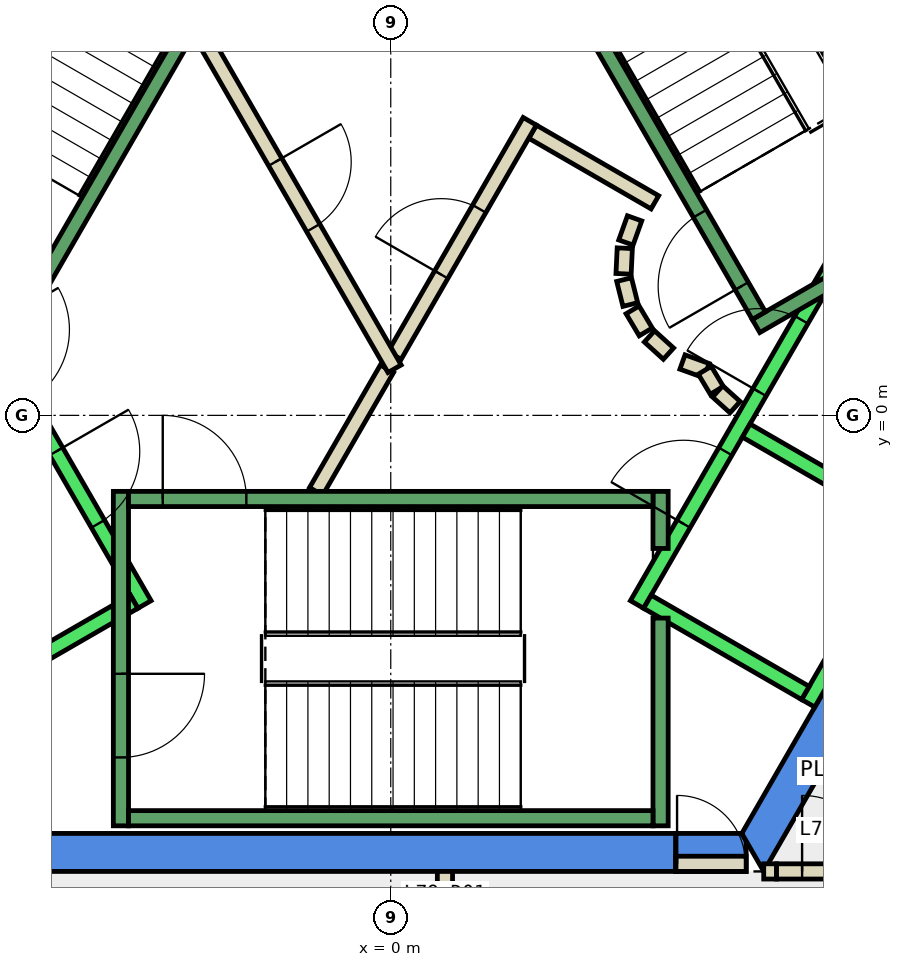
"""IFC4 building model, lengths in metres.
Left out: names, types, materials, properties, quantities, classifications, styles, units other than length and angle.
Written with IfcOpenShell. Run it as: python <this file> out.ifc"""

import sys

from ifc_helpers import new_model, si_unit, direction, frame, frame_2d, origin, place, context, subcontext, project, spatial, polyline, rectangle, outline, extrude, element, fill, save


model = new_model("IFC4")
c1 = context("Model", 3, precision=1e-05, world=origin(), true_north=direction((0.0, 1.0)))
c2 = subcontext(c1, "Body", "Model", "MODEL_VIEW")
j1 = project(units=[si_unit("LENGTHUNIT", "METRE"), si_unit("PLANEANGLEUNIT", "RADIAN")], contexts=[c1])
p1 = place(None, origin())
s1 = spatial("IfcSite", under=j1, at=p1, CompositionType="ELEMENT")
p2 = place(p1, origin())
s2 = spatial("IfcBuilding", under=s1, at=p2, CompositionType="ELEMENT")
p3 = place(p2, frame((0.0, 0.0, 335.9)))
s3 = spatial("IfcBuildingStorey", under=s2, at=p3, CompositionType="ELEMENT", Elevation=335.9)
p4 = place(p3, frame((0.0, 0.0, -0.35)))
e1 = element("IfcWall", 1, at=p4, inside=s3, PredefinedType="SHEAR", context=c2, shape_type="SweptSolid", body=[
    extrude(outline(polyline([(5.486, 9.998), (5.053, 9.748), (9.238, 2.5), (9.815, 2.5), (5.486, 9.998)])), origin(), (0.0, 0.0, 1.0), 4.4),
])
p5 = place(p3, frame((0.0, 0.0, -0.35)))
e2 = element("IfcWall", 2, at=p5, inside=s3, PredefinedType="SHEAR", context=c2, shape_type="SweptSolid", body=[
    extrude(outline(polyline([(3.75, -6.0), (3.75, -5.5), (-4.619, -5.5), (-4.907, -6.0), (3.75, -6.0)])), origin(), (0.0, 0.0, 1.0), 4.4),
])
p6 = place(p3, frame((0.0, 0.0, 3.6)))
e3 = element("IfcWall", 3, at=p6, inside=s3, PredefinedType="SHEAR", context=c2, shape_type="SweptSolid", body=[
    extrude(outline(polyline([(4.676, -6.0), (4.676, -5.6), (4.619, -5.5), (3.75, -5.5), (3.75, -6.0), (4.676, -6.0)])), origin(), (0.0, 0.0, 1.0), 0.45),
])
p7 = place(p3, frame((0.0, 0.0, -0.35)))
e4 = element("IfcWall", 4, at=p7, inside=s3, PredefinedType="SHEAR", context=c2, shape_type="SweptSolid", body=[
    extrude(outline(polyline([(4.907, -6.0), (9.815, 2.5), (9.238, 2.5), (4.619, -5.5), (4.907, -6.0)])), origin(), (0.0, 0.0, 1.0), 4.4),
])
p8 = place(p3, frame((-0.982, -1.0, 0.0), z_axis=(0.0, 0.0, 1.0), x_axis=(0.50024047865, 0.865886518847, 0.0)))
e5 = element("IfcWall", 5, at=p8, inside=s3, PredefinedType="PARTITIONING", context=c2, shape_type="SweptSolid", body=[
    extrude(rectangle(XDim=1.863, YDim=0.2, at=frame_2d((0.931, 0.0))), origin(), (0.0, 0.0, 1.0), 4.05),
])
p9 = place(p3, frame((1.866, 3.732, 0.0), z_axis=(0.0, 0.0, 1.0), x_axis=(0.866043361281, -0.499968895414, 0.0)))
e6 = element("IfcWall", 6, at=p9, inside=s3, PredefinedType="PARTITIONING", context=c2, shape_type="SweptSolid", body=[
    extrude(rectangle(XDim=1.858, YDim=0.2, at=frame_2d((0.929, 0.0))), origin(), (0.0, 0.0, 1.0), 4.05),
])
p10 = place(p3, frame((3.208, 2.592, 0.0), z_axis=(0.0, 0.0, 1.0), x_axis=(-0.337388820924, -0.941365382578, 0.0)))
e7 = element("IfcWall", 7, at=p10, inside=s3, PredefinedType="PARTITIONING", context=c2, shape_type="SweptSolid", body=[
    extrude(rectangle(XDim=0.338, YDim=0.2, at=frame_2d((0.169, 0.0))), origin(), (0.0, 0.0, 1.0), 4.05),
])
p11 = place(p3, frame((3.079, 2.199, 0.0), z_axis=(0.0, 0.0, 1.0), x_axis=(-0.047771483479, -0.998858290933, 0.0)))
e8 = element("IfcWall", 8, at=p11, inside=s3, PredefinedType="PARTITIONING", context=c2, shape_type="SweptSolid", body=[
    extrude(rectangle(XDim=0.337, YDim=0.2, at=frame_2d((0.169, 0.0))), origin(), (0.0, 0.0, 1.0), 4.05),
])
p12 = place(p3, frame((3.07, 1.786, 0.0), z_axis=(0.0, 0.0, 1.0), x_axis=(0.242705583207, -0.970099994784, 0.0)))
e9 = element("IfcWall", 9, at=p12, inside=s3, PredefinedType="PARTITIONING", context=c2, shape_type="SweptSolid", body=[
    extrude(rectangle(XDim=0.338, YDim=0.2, at=frame_2d((0.169, 0.0))), origin(), (0.0, 0.0, 1.0), 4.05),
])
for number, where, z_axis, x_axis in (
    (10, (3.182, 1.388, 0.0), (0.0, 0.0, 1.0), (0.512, -0.859, 0.0)),
    (11, (3.404, 1.039, 0.0), (0.0, 0.0, 1.0), (0.74, -0.672, 0.0)),
):
    element("IfcWall", number, at=place(p3, frame(where, z_axis=z_axis, x_axis=x_axis)), inside=s3, PredefinedType="PARTITIONING", context=c2, shape_type="SweptSolid", body=[
        extrude(rectangle(XDim=0.338, YDim=0.2, at=frame_2d((0.169, 0.0))), origin(), (0.0, 0.0, 1.0), 4.05),
    ])
p13 = place(p3, frame((3.838, 0.702, 0.0), z_axis=(0.0, 0.0, 1.0), x_axis=(0.941035081519, -0.338308993895, 0.0)))
e12 = element("IfcWall", 12, at=p13, inside=s3, PredefinedType="PARTITIONING", context=c2, shape_type="SweptSolid", body=[
    extrude(rectangle(XDim=0.337, YDim=0.2, at=frame_2d((0.168, 0.0))), origin(), (0.0, 0.0, 1.0), 4.05),
])
p14 = place(p3, frame((4.132, 0.593, 0.0), z_axis=(0.0, 0.0, 1.0), x_axis=(0.513561617048, -0.858052717201, 0.0)))
e13 = element("IfcWall", 13, at=p14, inside=s3, PredefinedType="PARTITIONING", context=c2, shape_type="SweptSolid", body=[
    extrude(rectangle(XDim=0.308, YDim=0.2, at=frame_2d((0.154, 0.0))), origin(), (0.0, 0.0, 1.0), 4.05),
])
p15 = place(p3, frame((4.301, 0.315, 0.0), z_axis=(0.0, 0.0, 1.0), x_axis=(0.741798017506, -0.670623367639, 0.0)))
e14 = element("IfcWall", 14, at=p15, inside=s3, PredefinedType="PARTITIONING", context=c2, shape_type="SweptSolid", body=[
    extrude(rectangle(XDim=0.309, YDim=0.2, at=frame_2d((0.154, 0.0))), origin(), (0.0, 0.0, 1.0), 4.05),
])
p16 = place(p3, frame((0.05, 0.787, 0.0), z_axis=(0.0, 0.0, 1.0), x_axis=(0.499954076797, 0.866051915934, 0.0)))
e15 = element("IfcWall", 15, at=p16, inside=s3, PredefinedType="PARTITIONING", context=c2, shape_type="SweptSolid", body=[
    extrude(rectangle(XDim=3.558, YDim=0.2, at=frame_2d((1.779, 0.0))), origin(), (0.0, 0.0, 1.0), 4.05),
])
p17 = place(p16, frame((1.229, 0.0, 0.0)))
e16 = element("IfcOpeningElement", 16, at=p17, cuts=e15, PredefinedType="OPENING", context=c2, shape_type="SweptSolid", body=[
    extrude(rectangle(XDim=1.0, YDim=2.1, at=frame_2d((0.5, 1.05))), frame((0.0, 0.11, 0.0), z_axis=(0.0, -1.0, 0.0), x_axis=(1.0, 0.0, 0.0)), (0.0, 0.0, 1.0), 0.22),
])
p18 = place(p3, frame((-2.54, 5.1, 0.0), z_axis=(0.0, 0.0, 1.0), x_axis=(0.499925051871, -0.866068670783, 0.0)))
e17 = element("IfcWall", 17, at=p18, inside=s3, PredefinedType="PARTITIONING", context=c2, shape_type="SweptSolid", body=[
    extrude(rectangle(XDim=5.181, YDim=0.2, at=frame_2d((2.59, 0.0))), origin(), (0.0, 0.0, 1.0), 4.05),
])
p19 = place(p18, frame((2.04, 0.0, 0.0)))
e18 = element("IfcOpeningElement", 18, at=p19, cuts=e17, PredefinedType="OPENING", context=c2, shape_type="SweptSolid", body=[
    extrude(rectangle(XDim=1.0, YDim=2.1, at=frame_2d((0.5, 1.05))), frame((0.0, 0.11, 0.0), z_axis=(0.0, -1.0, 0.0), x_axis=(1.0, 0.0, 0.0)), (0.0, 0.0, 1.0), 0.22),
])
p20 = place(p3, frame((0.713, -7.9, 0.0), z_axis=(0.0, 0.0, 1.0), x_axis=(0.0, 1.0, 0.0)))
e19 = element("IfcWall", 19, at=p20, inside=s3, PredefinedType="PARTITIONING", context=c2, shape_type="SweptSolid", body=[
    extrude(rectangle(XDim=1.9, YDim=0.2, at=frame_2d((0.95, 0.0))), origin(), (0.0, 0.0, 1.0), 4.05),
])
p21 = place(p20, frame((0.3, 0.0, 0.0)))
e20 = element("IfcOpeningElement", 20, at=p21, cuts=e19, PredefinedType="OPENING", context=c2, shape_type="SweptSolid", body=[
    extrude(rectangle(XDim=1.0, YDim=2.1, at=frame_2d((0.5, 1.05))), frame((0.0, 0.11, 0.0), z_axis=(0.0, -1.0, 0.0), x_axis=(1.0, 0.0, 0.0)), (0.0, 0.0, 1.0), 0.22),
])
p22 = place(p3, frame((4.907, -6.0, 0.0), z_axis=(0.0, 0.0, 1.0), x_axis=(1.0, 0.0, 0.0)))
e21 = element("IfcWall", 21, at=p22, inside=s3, PredefinedType="PARTITIONING", context=c2, shape_type="SweptSolid", body=[
    extrude(rectangle(XDim=0.169, YDim=0.2, at=frame_2d((0.084, 0.0))), origin(), (0.0, 0.0, 1.0), 2.4),
])
p23 = place(p3, frame((3.75, -5.9, 0.0), z_axis=(0.0, 0.0, 1.0), x_axis=(1.0, 0.0, 0.0)))
e22 = element("IfcWall", 22, at=p23, inside=s3, PredefinedType="PARTITIONING", context=c2, shape_type="SweptSolid", body=[
    extrude(rectangle(XDim=0.926, YDim=0.2, at=frame_2d((0.463, 0.0))), origin(), (0.0, 0.0, 1.0), 2.4),
])
p24 = place(p23, frame((0.017, 0.0, 0.0)))
e23 = element("IfcOpeningElement", 23, at=p24, cuts=e22, PredefinedType="OPENING", context=c2, shape_type="SweptSolid", body=[
    extrude(rectangle(XDim=0.9, YDim=2.1, at=frame_2d((0.45, 1.05))), frame((0.0, 0.11, 0.0), z_axis=(0.0, -1.0, 0.0), x_axis=(1.0, 0.0, 0.0)), (0.0, 0.0, 1.0), 0.22),
])
p25 = place(p3, frame((5.076, -6.0, 0.0), z_axis=(0.0, 0.0, 1.0), x_axis=(1.0, 0.0, 0.0)))
e24 = element("IfcWall", 24, at=p25, inside=s3, PredefinedType="PARTITIONING", context=c2, shape_type="SweptSolid", body=[
    extrude(rectangle(XDim=1.941, YDim=0.2, at=frame_2d((0.971, 0.0))), origin(), (0.0, 0.0, 1.0), 4.05),
])
p26 = place(p25, frame((0.336, 0.0, 0.0)))
e25 = element("IfcOpeningElement", 25, at=p26, cuts=e24, PredefinedType="OPENING", context=c2, shape_type="SweptSolid", body=[
    extrude(rectangle(XDim=1.0, YDim=2.1, at=frame_2d((0.5, 1.05))), frame((0.0, 0.11, 0.0), z_axis=(0.0, -1.0, 0.0), x_axis=(1.0, 0.0, 0.0)), (0.0, 0.0, 1.0), 0.22),
])
p27 = place(p3, frame((-5.94, 2.188, 0.0), z_axis=(0.0, 0.0, 1.0), x_axis=(0.500034260056, -0.866005622828, 0.0)))
e26 = element("IfcWall", 26, at=p27, inside=s3, PredefinedType="STANDARD", context=c2, shape_type="SweptSolid", body=[
    extrude(rectangle(XDim=5.399, YDim=0.2, at=frame_2d((2.7, 0.0))), origin(), (0.0, 0.0, 1.0), 4.05),
])
p28 = place(p27, frame((3.075, 0.0, 0.0)))
e27 = element("IfcOpeningElement", 27, at=p28, cuts=e26, PredefinedType="OPENING", context=c2, shape_type="SweptSolid", body=[
    extrude(rectangle(XDim=1.1, YDim=2.1, at=frame_2d((0.55, 1.05))), frame((0.0, 0.11, 0.0), z_axis=(0.0, -1.0, 0.0), x_axis=(1.0, 0.0, 0.0)), (0.0, 0.0, 1.0), 0.22),
])
p29 = place(p27, frame((1.225, 0.0, 0.0)))
e28 = element("IfcOpeningElement", 28, at=p29, cuts=e26, PredefinedType="OPENING", context=c2, shape_type="SweptSolid", body=[
    extrude(rectangle(XDim=1.1, YDim=2.1, at=frame_2d((0.55, 1.05))), frame((0.0, 0.11, 0.0), z_axis=(0.0, -1.0, 0.0), x_axis=(1.0, 0.0, 0.0)), (0.0, 0.0, 1.0), 0.22),
])
p30 = place(p3, frame((-3.377, -2.452, 0.0), z_axis=(0.0, 0.0, 1.0), x_axis=(-0.865955154139, -0.50012165622, 0.0)))
e29 = element("IfcWall", 29, at=p30, inside=s3, PredefinedType="STANDARD", context=c2, shape_type="SweptSolid", body=[
    extrude(rectangle(XDim=2.4, YDim=0.2, at=frame_2d((1.2, 0.0))), origin(), (0.0, 0.0, 1.0), 4.05),
])
p31 = place(p3, frame((3.24, -2.488, 0.0), z_axis=(0.0, 0.0, 1.0), x_axis=(0.500034260056, 0.866005622828, 0.0)))
e30 = element("IfcWall", 30, at=p31, inside=s3, PredefinedType="STANDARD", context=c2, shape_type="SweptSolid", body=[
    extrude(rectangle(XDim=5.399, YDim=0.2, at=frame_2d((2.7, 0.0))), origin(), (0.0, 0.0, 1.0), 4.05),
])
p32 = place(p31, frame((3.225, 0.0, 0.0)))
e31 = element("IfcOpeningElement", 31, at=p32, cuts=e30, PredefinedType="OPENING", context=c2, shape_type="SweptSolid", body=[
    extrude(rectangle(XDim=1.1, YDim=2.1, at=frame_2d((0.55, 1.05))), frame((0.0, 0.11, 0.0), z_axis=(0.0, -1.0, 0.0), x_axis=(1.0, 0.0, 0.0)), (0.0, 0.0, 1.0), 0.22),
])
p33 = place(p31, frame((1.225, 0.0, 0.0)))
e32 = element("IfcOpeningElement", 32, at=p33, cuts=e30, PredefinedType="OPENING", context=c2, shape_type="SweptSolid", body=[
    extrude(rectangle(XDim=1.1, YDim=2.1, at=frame_2d((0.55, 1.05))), frame((0.0, 0.11, 0.0), z_axis=(0.0, -1.0, 0.0), x_axis=(1.0, 0.0, 0.0)), (0.0, 0.0, 1.0), 0.22),
])
p34 = place(p3, frame((5.492, -3.788, 0.0), z_axis=(0.0, 0.0, 1.0), x_axis=(0.500034260056, 0.866005622828, 0.0)))
e33 = element("IfcWall", 33, at=p34, inside=s3, PredefinedType="STANDARD", context=c2, shape_type="SweptSolid", body=[
    extrude(rectangle(XDim=5.399, YDim=0.2, at=frame_2d((2.7, 0.0))), origin(), (0.0, 0.0, 1.0), 4.05),
])
p35 = place(p3, frame((3.377, -2.452, 0.0), z_axis=(0.0, 0.0, 1.0), x_axis=(0.865955154139, -0.50012165622, 0.0)))
e34 = element("IfcWall", 34, at=p35, inside=s3, PredefinedType="STANDARD", context=c2, shape_type="SweptSolid", body=[
    extrude(rectangle(XDim=2.4, YDim=0.2, at=frame_2d((1.2, 0.0))), origin(), (0.0, 0.0, 1.0), 4.05),
])
p36 = place(p3, frame((4.677, -0.2, 0.0), z_axis=(0.0, 0.0, 1.0), x_axis=(0.865973769406, -0.500089422704, 0.0)))
e35 = element("IfcWall", 35, at=p36, inside=s3, PredefinedType="STANDARD", context=c2, shape_type="SweptSolid", body=[
    extrude(rectangle(XDim=2.399, YDim=0.2, at=frame_2d((1.2, 0.0))), origin(), (0.0, 0.0, 1.0), 4.05),
])
p37 = place(p3, frame((-3.55, -1.0, 0.0), z_axis=(0.0, 0.0, 1.0), x_axis=(0.0, -1.0, 0.0)))
e36 = element("IfcWall", 36, at=p37, inside=s3, PredefinedType="STANDARD", context=c2, shape_type="SweptSolid", body=[
    extrude(rectangle(XDim=4.4, YDim=0.2, at=frame_2d((2.2, 0.0))), origin(), (0.0, 0.0, 1.0), 4.05),
])
p38 = place(p37, frame((2.4, 0.0, 0.0)))
e37 = element("IfcOpeningElement", 37, at=p38, cuts=e36, PredefinedType="OPENING", context=c2, shape_type="SweptSolid", body=[
    extrude(rectangle(XDim=1.1, YDim=2.2, at=frame_2d((0.55, 1.1))), frame((0.0, 0.11, 0.0), z_axis=(0.0, -1.0, 0.0), x_axis=(1.0, 0.0, 0.0)), (0.0, 0.0, 1.0), 0.22),
])
p39 = place(p3, frame((3.55, -2.667, 0.0), z_axis=(0.0, 0.0, 1.0), x_axis=(0.0, -1.0, 0.0)))
e38 = element("IfcWall", 38, at=p39, inside=s3, PredefinedType="STANDARD", context=c2, shape_type="SweptSolid", body=[
    extrude(rectangle(XDim=2.733, YDim=0.2, at=frame_2d((1.366, 0.0))), origin(), (0.0, 0.0, 1.0), 4.05),
])
p40 = place(p3, frame((3.55, -1.0, 0.0), z_axis=(0.0, 0.0, 1.0), x_axis=(0.0, -1.0, 0.0)))
e39 = element("IfcWall", 39, at=p40, inside=s3, PredefinedType="STANDARD", context=c2, shape_type="SweptSolid", body=[
    extrude(rectangle(XDim=0.751, YDim=0.2, at=frame_2d((0.375, 0.0))), origin(), (0.0, 0.0, 1.0), 4.05),
])
p41 = place(p3, frame((-3.45, -1.1, 0.0), z_axis=(0.0, 0.0, 1.0), x_axis=(1.0, 0.0, 0.0)))
e40 = element("IfcWall", 40, at=p41, inside=s3, PredefinedType="STANDARD", context=c2, shape_type="SweptSolid", body=[
    extrude(rectangle(XDim=6.9, YDim=0.2, at=frame_2d((3.45, 0.0))), origin(), (0.0, 0.0, 1.0), 4.05),
])
p42 = place(p41, frame((0.45, 0.0, 0.0)))
e41 = element("IfcOpeningElement", 41, at=p42, cuts=e40, PredefinedType="OPENING", context=c2, shape_type="SweptSolid", body=[
    extrude(rectangle(XDim=1.1, YDim=2.2, at=frame_2d((0.55, 1.1))), frame((0.0, 0.11, 0.0), z_axis=(0.0, -1.0, 0.0), x_axis=(1.0, 0.0, 0.0)), (0.0, 0.0, 1.0), 0.22),
])
p43 = place(p3, frame((-3.45, -5.3, 0.0), z_axis=(0.0, 0.0, 1.0), x_axis=(1.0, 0.0, 0.0)))
e42 = element("IfcWall", 42, at=p43, inside=s3, PredefinedType="STANDARD", context=c2, shape_type="SweptSolid", body=[
    extrude(rectangle(XDim=6.9, YDim=0.2, at=frame_2d((3.45, 0.0))), origin(), (0.0, 0.0, 1.0), 4.05),
])
p44 = place(p3, frame((4.806, 1.176, 0.0), z_axis=(0.0, 0.0, 1.0), x_axis=(0.866059941101, 0.499940174841, 0.0)))
e43 = element("IfcWall", 43, at=p44, inside=s3, PredefinedType="STANDARD", context=c2, shape_type="SweptSolid", body=[
    extrude(rectangle(XDim=4.4, YDim=0.2, at=frame_2d((2.2, 0.0))), origin(), (0.0, 0.0, 1.0), 4.05),
])
p45 = place(p44, frame((2.4, 0.0, 0.0)))
e44 = element("IfcOpeningElement", 44, at=p45, cuts=e43, PredefinedType="OPENING", context=c2, shape_type="SweptSolid", body=[
    extrude(rectangle(XDim=1.1, YDim=2.2, at=frame_2d((0.55, 1.1))), frame((0.0, 0.11, 0.0), z_axis=(0.0, -1.0, 0.0), x_axis=(1.0, 0.0, 0.0)), (0.0, 0.0, 1.0), 0.22),
])
p46 = place(p3, frame((4.843, 1.312, 0.0), z_axis=(0.0, 0.0, 1.0), x_axis=(-0.499963383562, 0.866046543262, 0.0)))
e45 = element("IfcWall", 45, at=p46, inside=s3, PredefinedType="STANDARD", context=c2, shape_type="SweptSolid", body=[
    extrude(rectangle(XDim=6.9, YDim=0.2, at=frame_2d((3.45, 0.0))), origin(), (0.0, 0.0, 1.0), 4.05),
])
p47 = place(p46, frame((0.45, 0.0, 0.0)))
e46 = element("IfcOpeningElement", 46, at=p47, cuts=e45, PredefinedType="OPENING", context=c2, shape_type="SweptSolid", body=[
    extrude(rectangle(XDim=1.1, YDim=2.2, at=frame_2d((0.55, 1.1))), frame((0.0, 0.11, 0.0), z_axis=(0.0, -1.0, 0.0), x_axis=(1.0, 0.0, 0.0)), (0.0, 0.0, 1.0), 0.22),
])
p48 = place(p3, frame((8.48, 3.412, 0.0), z_axis=(0.0, 0.0, 1.0), x_axis=(-0.499978703459, 0.866037698999, 0.0)))
e47 = element("IfcWall", 47, at=p48, inside=s3, PredefinedType="STANDARD", context=c2, shape_type="SweptSolid", body=[
    extrude(rectangle(XDim=6.9, YDim=0.2, at=frame_2d((3.45, 0.0))), origin(), (0.0, 0.0, 1.0), 4.05),
])
p49 = place(p3, frame((-1.393, 7.288, 0.0), z_axis=(0.0, 0.0, 1.0), x_axis=(-0.499963383562, -0.866046543262, 0.0)))
e48 = element("IfcWall", 48, at=p49, inside=s3, PredefinedType="STANDARD", context=c2, shape_type="SweptSolid", body=[
    extrude(rectangle(XDim=6.9, YDim=0.2, at=frame_2d((3.45, 0.0))), origin(), (0.0, 0.0, 1.0), 4.05),
])
p50 = place(p49, frame((0.45, 0.0, 0.0)))
e49 = element("IfcOpeningElement", 49, at=p50, cuts=e48, PredefinedType="OPENING", context=c2, shape_type="SweptSolid", body=[
    extrude(rectangle(XDim=1.1, YDim=2.2, at=frame_2d((0.55, 1.1))), frame((0.0, 0.11, 0.0), z_axis=(0.0, -1.0, 0.0), x_axis=(1.0, 0.0, 0.0)), (0.0, 0.0, 1.0), 0.22),
])
p51 = place(p26, origin())
e50 = element("IfcDoor", 50, at=p51, inside=s3, OperationType="SINGLE_SWING_RIGHT", PredefinedType="DOOR", context=c2, shape_type="SweptSolid", body=[
    extrude(rectangle(XDim=1.0, YDim=2.1, at=frame_2d((0.5, 1.05))), frame((0.0, 0.025, 0.0), z_axis=(0.0, -1.0, 0.0), x_axis=(1.0, 0.0, 0.0)), (0.0, 0.0, 1.0), 0.05),
])
fill(e25, e50)
p52 = place(p17, origin())
e51 = element("IfcDoor", 51, at=p52, inside=s3, OperationType="SINGLE_SWING_RIGHT", PredefinedType="DOOR", context=c2, shape_type="SweptSolid", body=[
    extrude(rectangle(XDim=1.0, YDim=2.1, at=frame_2d((0.5, 1.05))), frame((0.0, 0.025, 0.0), z_axis=(0.0, -1.0, 0.0), x_axis=(1.0, 0.0, 0.0)), (0.0, 0.0, 1.0), 0.05),
])
fill(e16, e51)
p53 = place(p19, origin())
e52 = element("IfcDoor", 52, at=p53, inside=s3, OperationType="SINGLE_SWING_RIGHT", PredefinedType="DOOR", context=c2, shape_type="SweptSolid", body=[
    extrude(rectangle(XDim=1.0, YDim=2.1, at=frame_2d((0.5, 1.05))), frame((0.0, 0.025, 0.0), z_axis=(0.0, -1.0, 0.0), x_axis=(1.0, 0.0, 0.0)), (0.0, 0.0, 1.0), 0.05),
])
fill(e18, e52)
p54 = place(p24, origin())
e53 = element("IfcDoor", 53, at=p54, inside=s3, OperationType="SINGLE_SWING_LEFT", PredefinedType="DOOR", context=c2, shape_type="SweptSolid", body=[
    extrude(rectangle(XDim=0.9, YDim=2.1, at=frame_2d((0.45, 1.05))), frame((0.0, 0.025, 0.0), z_axis=(0.0, -1.0, 0.0), x_axis=(1.0, 0.0, 0.0)), (0.0, 0.0, 1.0), 0.05),
])
fill(e23, e53)
p55 = place(p32, origin())
e54 = element("IfcDoor", 54, at=p55, inside=s3, OperationType="SLIDING_TO_LEFT", PredefinedType="DOOR", context=c2, shape_type="SweptSolid", body=[
    extrude(rectangle(XDim=1.1, YDim=2.1, at=frame_2d((0.55, 1.05))), frame((0.0, 0.025, 0.0), z_axis=(0.0, -1.0, 0.0), x_axis=(1.0, 0.0, 0.0)), (0.0, 0.0, 1.0), 0.05),
])
fill(e31, e54)
p56 = place(p28, origin())
e55 = element("IfcDoor", 55, at=p56, inside=s3, OperationType="SLIDING_TO_LEFT", PredefinedType="DOOR", context=c2, shape_type="SweptSolid", body=[
    extrude(rectangle(XDim=1.1, YDim=2.1, at=frame_2d((0.55, 1.05))), frame((0.0, 0.025, 0.0), z_axis=(0.0, -1.0, 0.0), x_axis=(1.0, 0.0, 0.0)), (0.0, 0.0, 1.0), 0.05),
])
fill(e27, e55)
p57 = place(p33, origin())
e56 = element("IfcDoor", 56, at=p57, inside=s3, OperationType="SLIDING_TO_LEFT", PredefinedType="DOOR", context=c2, shape_type="SweptSolid", body=[
    extrude(rectangle(XDim=1.1, YDim=2.1, at=frame_2d((0.55, 1.05))), frame((0.0, 0.025, 0.0), z_axis=(0.0, -1.0, 0.0), x_axis=(1.0, 0.0, 0.0)), (0.0, 0.0, 1.0), 0.05),
])
fill(e32, e56)
p58 = place(p42, origin())
e57 = element("IfcDoor", 57, at=p58, inside=s3, OperationType="SINGLE_SWING_LEFT", PredefinedType="DOOR", context=c2, shape_type="SweptSolid", body=[
    extrude(rectangle(XDim=1.1, YDim=2.2, at=frame_2d((0.55, 1.1))), frame((0.0, 0.025, 0.0), z_axis=(0.0, -1.0, 0.0), x_axis=(1.0, 0.0, 0.0)), (0.0, 0.0, 1.0), 0.05),
])
fill(e41, e57)
p59 = place(p38, origin())
e58 = element("IfcDoor", 58, at=p59, inside=s3, OperationType="SINGLE_SWING_LEFT", PredefinedType="DOOR", context=c2, shape_type="SweptSolid", body=[
    extrude(rectangle(XDim=1.1, YDim=2.2, at=frame_2d((0.55, 1.1))), frame((0.0, 0.025, 0.0), z_axis=(0.0, -1.0, 0.0), x_axis=(1.0, 0.0, 0.0)), (0.0, 0.0, 1.0), 0.05),
])
fill(e37, e58)
p60 = place(p47, origin())
e59 = element("IfcDoor", 59, at=p60, inside=s3, OperationType="SINGLE_SWING_LEFT", PredefinedType="DOOR", context=c2, shape_type="SweptSolid", body=[
    extrude(rectangle(XDim=1.1, YDim=2.2, at=frame_2d((0.55, 1.1))), frame((0.0, 0.025, 0.0), z_axis=(0.0, -1.0, 0.0), x_axis=(1.0, 0.0, 0.0)), (0.0, 0.0, 1.0), 0.05),
])
fill(e46, e59)
save(model, sys.argv[1])
